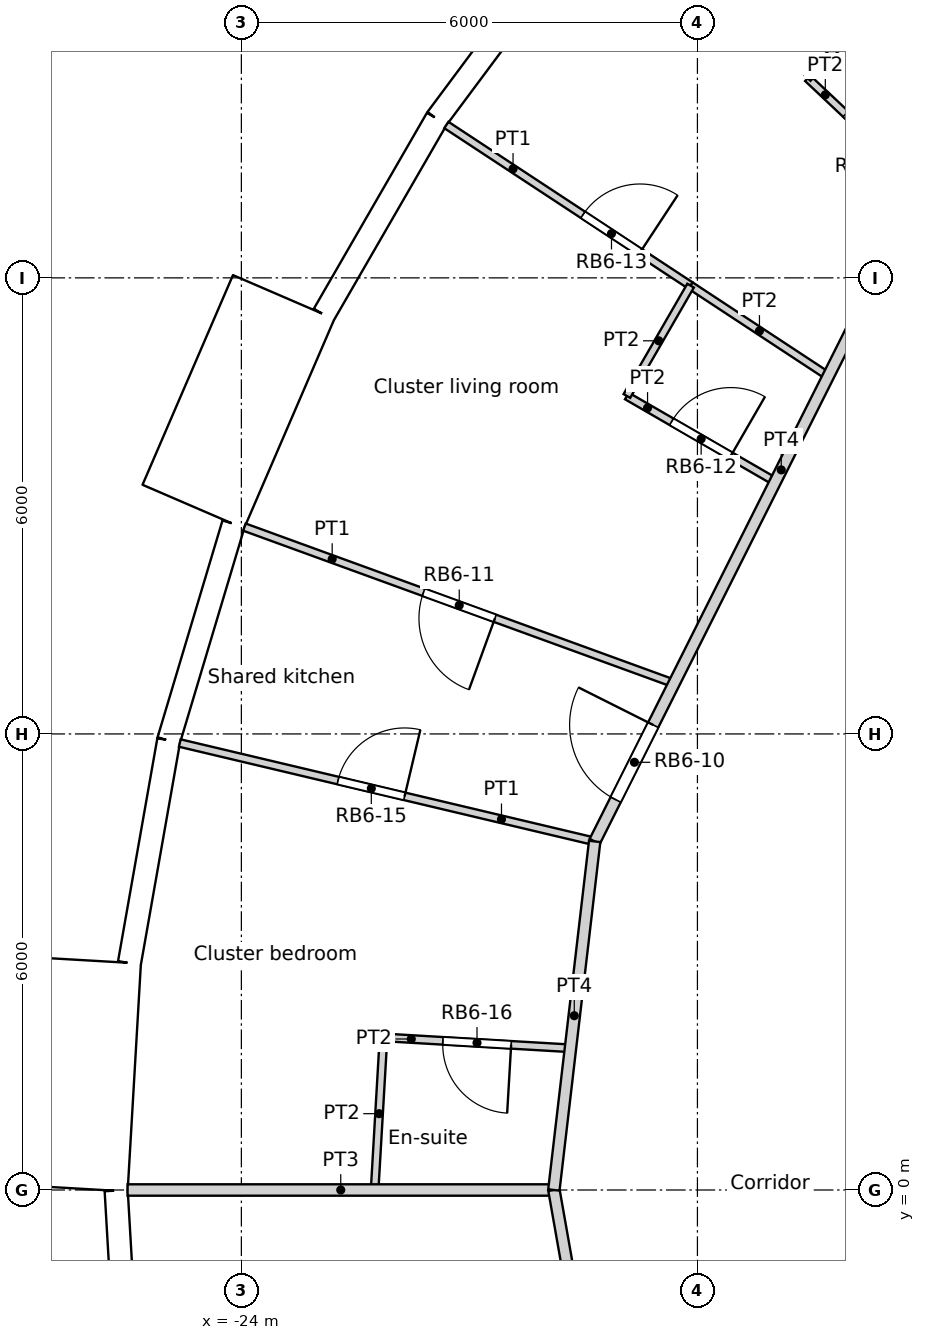
"""IFC4 building model, lengths in metres.
Left out: names, types, materials, properties, quantities, classifications, styles, units other than length and angle.
Written with IfcOpenShell. Run it as: python <this file> out.ifc"""

import sys

from ifc_helpers import new_model, si_unit, direction, frame, frame_2d, origin, origin_2d, place, context, subcontext, project, spatial, rectangle, circle, extrude, element, fill, save


model = new_model("IFC4")
c1 = context("Model", 3, precision=1e-05, world=origin(), true_north=direction((0.0, 1.0)))
c2 = subcontext(c1, "Body", "Model", "MODEL_VIEW")
j1 = project(units=[si_unit("LENGTHUNIT", "METRE"), si_unit("PLANEANGLEUNIT", "RADIAN")], contexts=[c1])
p1 = place(None, origin())
s1 = spatial("IfcSite", under=j1, at=p1, CompositionType="ELEMENT")
p2 = place(p1, origin())
s2 = spatial("IfcBuilding", under=s1, at=p2, CompositionType="ELEMENT")
p3 = place(p2, frame((0.0, 0.0, 180.0)))
s3 = spatial("IfcBuildingStorey", under=s2, at=p3, CompositionType="ELEMENT", Elevation=180.0)
for number, where, z_axis, x_axis in (
    (1, (-20.509, 13.489, 0.0), (0.0, 0.0, 1.0), (1.0, 0.0, 0.0)),
    (2, (-23.067, 8.396, 0.0), (0.0, 0.0, 1.0), (1.0, 0.0, 0.0)),
    (3, (-24.382, 2.85, 0.0), (0.0, 0.0, 1.0), (1.0, 0.0, 0.0)),
):
    element("IfcColumn", number, at=place(p3, frame(where, z_axis=z_axis, x_axis=x_axis)), inside=s3, PredefinedType="COLUMN", context=c2, shape_type="SweptSolid", body=[
        extrude(circle(Radius=0.6, at=origin_2d()), origin(), (0.0, 0.0, 1.0), 3.6),
    ])
for number, where, z_axis, x_axis in (
    (4, (-16.958, 8.167, 0.0), (0.0, 0.0, 1.0), (1.0, 0.0, 0.0)),
    (5, (-18.612, 2.805, 0.0), (0.0, 0.0, 1.0), (1.0, 0.0, 0.0)),
):
    element("IfcColumn", number, at=place(p3, frame(where, z_axis=z_axis, x_axis=x_axis)), inside=s3, PredefinedType="COLUMN", context=c2, shape_type="SweptSolid", body=[
        extrude(circle(Radius=0.65, at=origin_2d()), origin(), (0.0, 0.0, 1.0), 3.6),
    ])
p4 = place(p3, frame((-19.653, 16.478, 0.0), z_axis=(0.0, 0.0, 1.0), x_axis=(-0.597197580538, -0.80209416517, 0.0)))
e6 = element("IfcWall", 6, at=p4, inside=s3, PredefinedType="SOLIDWALL", context=c2, shape_type="SweptSolid", body=[
    extrude(rectangle(XDim=2.973, YDim=0.3, at=frame_2d((1.486, 0.0))), origin(), (0.0, 0.0, 1.0), 3.3),
])
p5 = place(p4, frame((1.486, 0.0, 1.55)))
e7 = element("IfcOpeningElement", 7, at=p5, cuts=e6, PredefinedType="OPENING", context=c2, shape_type="SweptSolid", body=[
    extrude(circle(Radius=0.9, at=origin_2d()), frame((0.0, 0.16, 0.0), z_axis=(0.0, -1.0, 0.0), x_axis=(1.0, 0.0, 0.0)), (0.0, 0.0, 1.0), 0.32),
])
p6 = place(p3, frame((-21.428, 14.094, 0.0), z_axis=(0.0, 0.0, 1.0), x_axis=(-0.499954672104, -0.866051572276, 0.0)))
e8 = element("IfcWall", 8, at=p6, inside=s3, PredefinedType="SOLIDWALL", context=c2, shape_type="SweptSolid", body=[
    extrude(rectangle(XDim=2.973, YDim=0.3, at=frame_2d((1.486, 0.0))), origin(), (0.0, 0.0, 1.0), 3.3),
])
p7 = place(p6, frame((1.486, 0.0, 1.55)))
e9 = element("IfcOpeningElement", 9, at=p7, cuts=e8, PredefinedType="OPENING", context=c2, shape_type="SweptSolid", body=[
    extrude(circle(Radius=0.9, at=origin_2d()), frame((0.0, 0.16, 0.0), z_axis=(0.0, -1.0, 0.0), x_axis=(1.0, 0.0, 0.0)), (0.0, 0.0, 1.0), 0.32),
])
p8 = place(p3, frame((-23.444, 11.746, -0.3), z_axis=(0.0, 0.0, 1.0), x_axis=(-0.396079003245, -0.918216435917, 0.0)))
e10 = element("IfcWall", 10, at=p8, inside=s3, PredefinedType="ELEMENTEDWALL", context=c2, shape_type="SweptSolid", body=[
    extrude(rectangle(XDim=3.0, YDim=1.45, at=frame_2d((1.5, 0.0))), origin(), (0.0, 0.0, 1.0), 3.6),
])
p9 = place(p8, frame((1.5, 0.0, 1.85)))
e11 = element("IfcOpeningElement", 11, at=p9, cuts=e10, PredefinedType="OPENING", context=c2, shape_type="SweptSolid", body=[
    extrude(circle(Radius=0.9, at=origin_2d()), frame((0.0, 0.735, 0.0), z_axis=(0.0, -1.0, 0.0), x_axis=(1.0, 0.0, 0.0)), (0.0, 0.0, 1.0), 1.47),
])
p10 = place(p3, frame((-24.104, 8.763, 0.0), z_axis=(0.0, 0.0, 1.0), x_axis=(-0.286782750849, -0.957995643944, 0.0)))
e12 = element("IfcWall", 12, at=p10, inside=s3, PredefinedType="SOLIDWALL", context=c2, shape_type="SweptSolid", body=[
    extrude(rectangle(XDim=2.973, YDim=0.3, at=frame_2d((1.486, 0.0))), origin(), (0.0, 0.0, 1.0), 3.3),
])
p11 = place(p10, frame((1.486, 0.0, 1.55)))
e13 = element("IfcOpeningElement", 13, at=p11, cuts=e12, PredefinedType="OPENING", context=c2, shape_type="SweptSolid", body=[
    extrude(circle(Radius=0.9, at=origin_2d()), frame((0.0, 0.16, 0.0), z_axis=(0.0, -1.0, 0.0), x_axis=(1.0, 0.0, 0.0)), (0.0, 0.0, 1.0), 0.32),
])
p12 = place(p3, frame((-24.956, 5.915, 0.0), z_axis=(0.0, 0.0, 1.0), x_axis=(-0.173686952598, -0.984800915159, 0.0)))
e14 = element("IfcWall", 14, at=p12, inside=s3, PredefinedType="SOLIDWALL", context=c2, shape_type="SweptSolid", body=[
    extrude(rectangle(XDim=2.973, YDim=0.3, at=frame_2d((1.486, 0.0))), origin(), (0.0, 0.0, 1.0), 3.3),
])
p13 = place(p12, frame((1.486, 0.0, 1.55)))
e15 = element("IfcOpeningElement", 15, at=p13, cuts=e14, PredefinedType="OPENING", context=c2, shape_type="SweptSolid", body=[
    extrude(circle(Radius=0.9, at=origin_2d()), frame((0.0, 0.16, 0.0), z_axis=(0.0, -1.0, 0.0), x_axis=(1.0, 0.0, 0.0)), (0.0, 0.0, 1.0), 0.32),
])
p14 = place(p3, frame((-26.048, 3.02, -0.3), z_axis=(0.0, 0.0, 1.0), x_axis=(-0.058106596105, -0.998310384344, 0.0)))
e16 = element("IfcWall", 16, at=p14, inside=s3, PredefinedType="ELEMENTEDWALL", context=c2, shape_type="SweptSolid", body=[
    extrude(rectangle(XDim=3.0, YDim=1.45, at=frame_2d((1.5, 0.0))), origin(), (0.0, 0.0, 1.0), 3.6),
])
p15 = place(p14, frame((1.5, 0.0, 1.85)))
e17 = element("IfcOpeningElement", 17, at=p15, cuts=e16, PredefinedType="OPENING", context=c2, shape_type="SweptSolid", body=[
    extrude(circle(Radius=0.9, at=origin_2d()), frame((0.0, 0.735, 0.0), z_axis=(0.0, -1.0, 0.0), x_axis=(1.0, 0.0, 0.0)), (0.0, 0.0, 1.0), 1.47),
])
p16 = place(p3, frame((-25.647, -0.01, 0.0), z_axis=(0.0, 0.0, 1.0), x_axis=(0.058139540521, -0.998308466271, 0.0)))
e18 = element("IfcWall", 18, at=p16, inside=s3, PredefinedType="SOLIDWALL", context=c2, shape_type="SweptSolid", body=[
    extrude(rectangle(XDim=2.973, YDim=0.3, at=frame_2d((1.487, 0.0))), origin(), (0.0, 0.0, 1.0), 3.3),
])
p17 = place(p16, frame((1.486, 0.0, 1.55)))
e19 = element("IfcOpeningElement", 19, at=p17, cuts=e18, PredefinedType="OPENING", context=c2, shape_type="SweptSolid", body=[
    extrude(circle(Radius=0.9, at=origin_2d()), frame((0.0, 0.16, 0.0), z_axis=(0.0, -1.0, 0.0), x_axis=(1.0, 0.0, 0.0)), (0.0, 0.0, 1.0), 0.32),
])
p18 = place(p3, frame((-19.351, 4.586, 0.0), z_axis=(0.0, 0.0, 1.0), x_axis=(0.44867140262, 0.893696801198, 0.0)))
e20 = element("IfcWall", 20, at=p18, inside=s3, PredefinedType="PARTITIONING", context=c2, shape_type="SweptSolid", body=[
    extrude(rectangle(XDim=9.174, YDim=0.15, at=frame_2d((4.587, 0.0))), origin(), (0.0, 0.0, 1.0), 3.3),
])
p19 = place(p18, frame((0.615, 0.0, 0.0)))
e21 = element("IfcOpeningElement", 21, at=p19, cuts=e20, PredefinedType="OPENING", context=c2, shape_type="SweptSolid", body=[
    extrude(rectangle(XDim=1.1, YDim=2.1, at=frame_2d((0.55, 1.05))), frame((0.0, 0.075, 0.0), z_axis=(0.0, -1.0, 0.0), x_axis=(1.0, 0.0, 0.0)), (0.0, 0.0, 1.0), 0.15),
])
p20 = place(p3, frame((-19.889, 0.0, 0.0), z_axis=(0.0, 0.0, 1.0), x_axis=(0.116221510549, 0.993223318537, 0.0)))
e22 = element("IfcWall", 22, at=p20, inside=s3, PredefinedType="PARTITIONING", context=c2, shape_type="SweptSolid", body=[
    extrude(rectangle(XDim=4.617, YDim=0.15, at=frame_2d((2.309, 0.0))), origin(), (0.0, 0.0, 1.0), 3.3),
])
p21 = place(p3, frame((-19.888, 0.0, 0.0), z_axis=(0.0, 0.0, 1.0), x_axis=(0.173728873845, -0.98479352069, 0.0)))
e23 = element("IfcWall", 23, at=p21, inside=s3, PredefinedType="PARTITIONING", context=c2, shape_type="SweptSolid", body=[
    extrude(rectangle(XDim=6.907, YDim=0.15, at=frame_2d((3.454, 0.0))), origin(), (0.0, 0.0, 1.0), 3.3),
])
p22 = place(p3, frame((-17.497, 18.546, 0.0), z_axis=(0.0, 0.0, 1.0), x_axis=(0.68633567779, -0.727284907991, 0.0)))
e24 = element("IfcWall", 24, at=p22, inside=s3, PredefinedType="PARTITIONING", context=c2, shape_type="SweptSolid", body=[
    extrude(rectangle(XDim=5.879, YDim=0.15, at=frame_2d((2.939, 0.0))), origin(), (0.0, 0.0, 1.0), 3.3),
])
p23 = place(p3, frame((-23.96, 8.721, 0.0), z_axis=(0.0, 0.0, 1.0), x_axis=(0.939704504136, -0.341987492326, 0.0)))
e25 = element("IfcWall", 25, at=p23, inside=s3, PredefinedType="PARTITIONING", context=c2, shape_type="SweptSolid", body=[
    extrude(rectangle(XDim=6.014, YDim=0.1, at=frame_2d((3.007, 0.0))), origin(), (0.0, 0.0, 1.0), 3.3),
])
p24 = place(p23, frame((2.508, 0.0, 0.0)))
e26 = element("IfcOpeningElement", 26, at=p24, cuts=e25, PredefinedType="OPENING", context=c2, shape_type="SweptSolid", body=[
    extrude(rectangle(XDim=1.0, YDim=2.04, at=frame_2d((0.5, 1.02))), frame((0.0, 0.05, 0.0), z_axis=(0.0, -1.0, 0.0), x_axis=(1.0, 0.0, 0.0)), (0.0, 0.0, 1.0), 0.1),
])
p25 = place(p3, frame((-18.928, 10.446, 0.0), z_axis=(0.0, 0.0, 1.0), x_axis=(0.499835922194, 0.866120113428, 0.0)))
e27 = element("IfcWall", 27, at=p25, inside=s3, PredefinedType="PARTITIONING", context=c2, shape_type="SweptSolid", body=[
    extrude(rectangle(XDim=1.676, YDim=0.1, at=frame_2d((0.838, 0.0))), origin(), (0.0, 0.0, 1.0), 3.3),
])
p26 = place(p3, frame((-18.928, 10.446, 0.0), z_axis=(0.0, 0.0, 1.0), x_axis=(0.865942177038, -0.500144125255, 0.0)))
e28 = element("IfcWall", 28, at=p26, inside=s3, PredefinedType="PARTITIONING", context=c2, shape_type="SweptSolid", body=[
    extrude(rectangle(XDim=2.255, YDim=0.1, at=frame_2d((1.127, 0.0))), origin(), (0.0, 0.0, 1.0), 3.3),
])
p27 = place(p26, frame((0.678, 0.0, 0.0)))
e29 = element("IfcOpeningElement", 29, at=p27, cuts=e28, PredefinedType="OPENING", context=c2, shape_type="SweptSolid", body=[
    extrude(rectangle(XDim=0.9, YDim=2.0, at=frame_2d((0.45, 1.0))), frame((0.0, 0.05, 0.0), z_axis=(0.0, -1.0, 0.0), x_axis=(1.0, 0.0, 0.0)), (0.0, 0.0, 1.0), 0.1),
])
p28 = place(p3, frame((-21.303, 14.011, 0.0), z_axis=(0.0, 0.0, 1.0), x_axis=(0.835501457061, -0.549488230309, 0.0)))
e30 = element("IfcWall", 30, at=p28, inside=s3, PredefinedType="PARTITIONING", context=c2, shape_type="SweptSolid", body=[
    extrude(rectangle(XDim=3.845, YDim=0.1, at=frame_2d((1.923, 0.0))), origin(), (0.0, 0.0, 1.0), 3.3),
])
p29 = place(p28, frame((2.15, 0.0, 0.0)))
e31 = element("IfcOpeningElement", 31, at=p29, cuts=e30, PredefinedType="OPENING", context=c2, shape_type="SweptSolid", body=[
    extrude(rectangle(XDim=0.9, YDim=2.1, at=frame_2d((0.45, 1.05))), frame((0.0, 0.05, 0.0), z_axis=(0.0, -1.0, 0.0), x_axis=(1.0, 0.0, 0.0)), (0.0, 0.0, 1.0), 0.1),
])
p30 = place(p3, frame((-24.81, 5.88, 0.0), z_axis=(0.0, 0.0, 1.0), x_axis=(0.973029918752, -0.230678948353, 0.0)))
e32 = element("IfcWall", 32, at=p30, inside=s3, PredefinedType="PARTITIONING", context=c2, shape_type="SweptSolid", body=[
    extrude(rectangle(XDim=5.609, YDim=0.1, at=frame_2d((2.805, 0.0))), origin(), (0.0, 0.0, 1.0), 3.3),
])
p31 = place(p30, frame((2.139, 0.0, 0.0)))
e33 = element("IfcOpeningElement", 33, at=p31, cuts=e32, PredefinedType="OPENING", context=c2, shape_type="SweptSolid", body=[
    extrude(rectangle(XDim=0.9, YDim=2.1, at=frame_2d((0.45, 1.05))), frame((0.0, 0.05, 0.0), z_axis=(0.0, -1.0, 0.0), x_axis=(1.0, 0.0, 0.0)), (0.0, 0.0, 1.0), 0.1),
])
p32 = place(p3, frame((-18.09, 11.898, 0.0), z_axis=(0.0, 0.0, 1.0), x_axis=(0.835463324296, -0.549546207116, 0.0)))
e34 = element("IfcWall", 34, at=p32, inside=s3, PredefinedType="PARTITIONING", context=c2, shape_type="SweptSolid", body=[
    extrude(rectangle(XDim=2.169, YDim=0.1, at=frame_2d((1.084, 0.0))), origin(), (0.0, 0.0, 1.0), 3.3),
])
p33 = place(p3, frame((-16.549, 14.626, 0.0), z_axis=(0.0, 0.0, 1.0), x_axis=(0.686337209023, 0.727283462971, 0.0)))
e35 = element("IfcWall", 35, at=p33, inside=s3, PredefinedType="PARTITIONING", context=c2, shape_type="SweptSolid", body=[
    extrude(rectangle(XDim=2.003, YDim=0.1, at=frame_2d((1.002, 0.0))), origin(), (0.0, 0.0, 1.0), 3.3),
])
p34 = place(p3, frame((-16.549, 14.626, 0.0), z_axis=(0.0, 0.0, 1.0), x_axis=(0.727754926423, -0.68583727448, 0.0)))
e36 = element("IfcWall", 36, at=p34, inside=s3, PredefinedType="PARTITIONING", context=c2, shape_type="SweptSolid", body=[
    extrude(rectangle(XDim=2.271, YDim=0.1, at=frame_2d((1.136, 0.0))), origin(), (0.0, 0.0, 1.0), 3.3),
])
p35 = place(p34, frame((0.686, 0.0, 0.0)))
e37 = element("IfcOpeningElement", 37, at=p35, cuts=e36, PredefinedType="OPENING", context=c2, shape_type="SweptSolid", body=[
    extrude(rectangle(XDim=0.9, YDim=2.04, at=frame_2d((0.45, 1.02))), frame((0.0, 0.05, 0.0), z_axis=(0.0, -1.0, 0.0), x_axis=(1.0, 0.0, 0.0)), (0.0, 0.0, 1.0), 0.1),
])
p36 = place(p3, frame((-22.13, 2.008, 0.0), z_axis=(0.0, 0.0, 1.0), x_axis=(0.998290052933, -0.058454856216, 0.0)))
e38 = element("IfcWall", 38, at=p36, inside=s3, PredefinedType="PARTITIONING", context=c2, shape_type="SweptSolid", body=[
    extrude(rectangle(XDim=2.464, YDim=0.1, at=frame_2d((1.232, 0.0))), origin(), (0.0, 0.0, 1.0), 3.3),
])
p37 = place(p36, frame((0.782, 0.0, 0.0)))
e39 = element("IfcOpeningElement", 39, at=p37, cuts=e38, PredefinedType="OPENING", context=c2, shape_type="SweptSolid", body=[
    extrude(rectangle(XDim=0.9, YDim=2.04, at=frame_2d((0.45, 1.02))), frame((0.0, 0.05, 0.0), z_axis=(0.0, -1.0, 0.0), x_axis=(1.0, 0.0, 0.0)), (0.0, 0.0, 1.0), 0.1),
])
p38 = place(p3, frame((-22.247, 0.0, 0.0), z_axis=(0.0, 0.0, 1.0), x_axis=(0.058259538708, 0.998301470574, 0.0)))
e40 = element("IfcWall", 40, at=p38, inside=s3, PredefinedType="PARTITIONING", context=c2, shape_type="SweptSolid", body=[
    extrude(rectangle(XDim=2.011, YDim=0.1, at=frame_2d((1.006, 0.0))), origin(), (0.0, 0.0, 1.0), 3.3),
])
p39 = place(p3, frame((-25.497, 0.0, 0.0), z_axis=(0.0, 0.0, 1.0), x_axis=(1.0, 0.0, 0.0)))
e41 = element("IfcWall", 41, at=p39, inside=s3, PredefinedType="PARTITIONING", context=c2, shape_type="SweptSolid", body=[
    extrude(rectangle(XDim=5.609, YDim=0.15, at=frame_2d((2.805, 0.0))), origin(), (0.0, 0.0, 1.0), 3.3),
])
p40 = place(p5, origin())
e42 = element("IfcWindow", 42, at=p40, inside=s3, PartitioningType="SINGLE_PANEL", PredefinedType="WINDOW", context=c2, shape_type="SweptSolid", body=[
    extrude(circle(Radius=0.9, at=origin_2d()), frame((0.0, 0.12, 0.0), z_axis=(0.0, -1.0, 0.0), x_axis=(1.0, 0.0, 0.0)), (0.0, 0.0, 1.0), 0.1),
])
fill(e7, e42)
p41 = place(p7, origin())
e43 = element("IfcWindow", 43, at=p41, inside=s3, PartitioningType="SINGLE_PANEL", PredefinedType="WINDOW", context=c2, shape_type="SweptSolid", body=[
    extrude(circle(Radius=0.9, at=origin_2d()), frame((0.0, 0.12, 0.0), z_axis=(0.0, -1.0, 0.0), x_axis=(1.0, 0.0, 0.0)), (0.0, 0.0, 1.0), 0.1),
])
fill(e9, e43)
p42 = place(p9, origin())
e44 = element("IfcWindow", 44, at=p42, inside=s3, PartitioningType="SINGLE_PANEL", PredefinedType="WINDOW", context=c2, shape_type="SweptSolid", body=[
    extrude(circle(Radius=0.9, at=origin_2d()), frame((0.0, 0.695, 0.0), z_axis=(0.0, -1.0, 0.0), x_axis=(1.0, 0.0, 0.0)), (0.0, 0.0, 1.0), 0.1),
])
fill(e11, e44)
p43 = place(p11, origin())
e45 = element("IfcWindow", 45, at=p43, inside=s3, PartitioningType="SINGLE_PANEL", PredefinedType="WINDOW", context=c2, shape_type="SweptSolid", body=[
    extrude(circle(Radius=0.9, at=origin_2d()), frame((0.0, 0.12, 0.0), z_axis=(0.0, -1.0, 0.0), x_axis=(1.0, 0.0, 0.0)), (0.0, 0.0, 1.0), 0.1),
])
fill(e13, e45)
p44 = place(p13, origin())
e46 = element("IfcWindow", 46, at=p44, inside=s3, PartitioningType="SINGLE_PANEL", PredefinedType="WINDOW", context=c2, shape_type="SweptSolid", body=[
    extrude(circle(Radius=0.9, at=origin_2d()), frame((0.0, 0.12, 0.0), z_axis=(0.0, -1.0, 0.0), x_axis=(1.0, 0.0, 0.0)), (0.0, 0.0, 1.0), 0.1),
])
fill(e15, e46)
p45 = place(p15, origin())
e47 = element("IfcWindow", 47, at=p45, inside=s3, PartitioningType="SINGLE_PANEL", PredefinedType="WINDOW", context=c2, shape_type="SweptSolid", body=[
    extrude(circle(Radius=0.9, at=origin_2d()), frame((0.0, 0.695, 0.0), z_axis=(0.0, -1.0, 0.0), x_axis=(1.0, 0.0, 0.0)), (0.0, 0.0, 1.0), 0.1),
])
fill(e17, e47)
p46 = place(p17, origin())
e48 = element("IfcWindow", 48, at=p46, inside=s3, PartitioningType="SINGLE_PANEL", PredefinedType="WINDOW", context=c2, shape_type="SweptSolid", body=[
    extrude(circle(Radius=0.9, at=origin_2d()), frame((0.0, 0.12, 0.0), z_axis=(0.0, -1.0, 0.0), x_axis=(1.0, 0.0, 0.0)), (0.0, 0.0, 1.0), 0.1),
])
fill(e19, e48)
p47 = place(p19, origin())
e49 = element("IfcDoor", 49, at=p47, inside=s3, OperationType="SINGLE_SWING_RIGHT", PredefinedType="DOOR", context=c2, shape_type="SweptSolid", body=[
    extrude(rectangle(XDim=1.1, YDim=2.1, at=frame_2d((0.55, 1.05))), frame((0.0, 0.025, 0.0), z_axis=(0.0, -1.0, 0.0), x_axis=(1.0, 0.0, 0.0)), (0.0, 0.0, 1.0), 0.05),
])
fill(e21, e49)
p48 = place(p24, origin())
e50 = element("IfcDoor", 50, at=p48, inside=s3, OperationType="SINGLE_SWING_LEFT", PredefinedType="DOOR", context=c2, shape_type="SweptSolid", body=[
    extrude(rectangle(XDim=1.0, YDim=2.04, at=frame_2d((0.5, 1.02))), frame((0.0, 0.025, 0.0), z_axis=(0.0, -1.0, 0.0), x_axis=(1.0, 0.0, 0.0)), (0.0, 0.0, 1.0), 0.05),
])
fill(e26, e50)
p49 = place(p27, origin())
e51 = element("IfcDoor", 51, at=p49, inside=s3, OperationType="SINGLE_SWING_RIGHT", PredefinedType="DOOR", context=c2, shape_type="SweptSolid", body=[
    extrude(rectangle(XDim=0.9, YDim=2.0, at=frame_2d((0.45, 1.0))), frame((0.0, 0.025, 0.0), z_axis=(0.0, -1.0, 0.0), x_axis=(1.0, 0.0, 0.0)), (0.0, 0.0, 1.0), 0.05),
])
fill(e29, e51)
p50 = place(p29, origin())
e52 = element("IfcDoor", 52, at=p50, inside=s3, OperationType="SINGLE_SWING_RIGHT", PredefinedType="DOOR", context=c2, shape_type="SweptSolid", body=[
    extrude(rectangle(XDim=0.9, YDim=2.1, at=frame_2d((0.45, 1.05))), frame((0.0, 0.025, 0.0), z_axis=(0.0, -1.0, 0.0), x_axis=(1.0, 0.0, 0.0)), (0.0, 0.0, 1.0), 0.05),
])
fill(e31, e52)
p51 = place(p35, origin())
e53 = element("IfcDoor", 53, at=p51, inside=s3, OperationType="SINGLE_SWING_RIGHT", PredefinedType="DOOR", context=c2, shape_type="SweptSolid", body=[
    extrude(rectangle(XDim=0.9, YDim=2.04, at=frame_2d((0.45, 1.02))), frame((0.0, 0.025, 0.0), z_axis=(0.0, -1.0, 0.0), x_axis=(1.0, 0.0, 0.0)), (0.0, 0.0, 1.0), 0.05),
])
fill(e37, e53)
p52 = place(p31, origin())
e54 = element("IfcDoor", 54, at=p52, inside=s3, OperationType="SINGLE_SWING_RIGHT", PredefinedType="DOOR", context=c2, shape_type="SweptSolid", body=[
    extrude(rectangle(XDim=0.9, YDim=2.1, at=frame_2d((0.45, 1.05))), frame((0.0, 0.025, 0.0), z_axis=(0.0, -1.0, 0.0), x_axis=(1.0, 0.0, 0.0)), (0.0, 0.0, 1.0), 0.05),
])
fill(e33, e54)
p53 = place(p37, origin())
e55 = element("IfcDoor", 55, at=p53, inside=s3, OperationType="SINGLE_SWING_LEFT", PredefinedType="DOOR", context=c2, shape_type="SweptSolid", body=[
    extrude(rectangle(XDim=0.9, YDim=2.04, at=frame_2d((0.45, 1.02))), frame((0.0, 0.025, 0.0), z_axis=(0.0, -1.0, 0.0), x_axis=(1.0, 0.0, 0.0)), (0.0, 0.0, 1.0), 0.05),
])
fill(e39, e55)
save(model, sys.argv[1])
